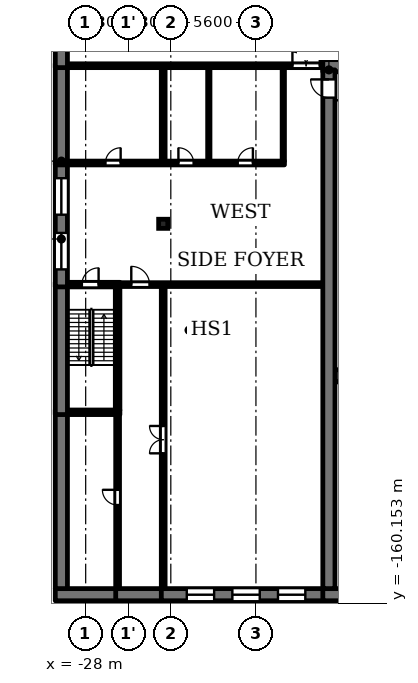
"""IFC4 building model, lengths in metres.
Left out: names, types, materials, properties, quantities, classifications, styles, units other than length and angle.
Written with IfcOpenShell. Run it as: python <this file> out.ifc"""

import sys

from ifc_helpers import new_model, si_unit, direction, frame, frame_2d, origin, origin_2d, place, context, subcontext, project, spatial, rectangle, extrude, element, fill, save


model = new_model("IFC4")
c1 = context("Model", 3, precision=1e-05, world=origin(), true_north=direction((0.0, 1.0)))
c2 = subcontext(c1, "Body", "Model", "MODEL_VIEW")
j1 = project(units=[si_unit("LENGTHUNIT", "METRE"), si_unit("PLANEANGLEUNIT", "RADIAN")], contexts=[c1])
p1 = place(None, origin())
s1 = spatial("IfcSite", under=j1, at=p1, CompositionType="ELEMENT")
p2 = place(p1, origin())
s2 = spatial("IfcBuilding", under=s1, at=p2, CompositionType="ELEMENT")
p3 = place(p2, frame((0.0, 0.0, 11.3)))
s3 = spatial("IfcBuildingStorey", under=s2, at=p3, CompositionType="ELEMENT", Elevation=11.3)
p4 = place(p3, frame((-22.9, -135.2, 0.0), z_axis=(0.0, 0.0, 1.0), x_axis=(1.0, 0.0, 0.0)))
e1 = element("IfcColumn", 1, at=p4, inside=s3, PredefinedType="COLUMN", context=c2, shape_type="SweptSolid", body=[
    extrude(rectangle(XDim=0.6, YDim=0.6, at=origin_2d()), origin(), (0.0, 0.0, 1.0), 4.45),
])
p5 = place(p3, frame((-30.0, -159.6, 0.0), z_axis=(0.0, 0.0, 1.0), x_axis=(1.0, 0.0, 0.0)))
e2 = element("IfcWall", 2, at=p5, inside=s3, PredefinedType="SOLIDWALL", context=c2, shape_type="SweptSolid", body=[
    extrude(rectangle(XDim=4.225, YDim=0.8, at=frame_2d((2.112, 0.0))), origin(), (0.0, 0.0, 1.0), 4.45),
])
p6 = place(p3, frame((-26.025, -159.6, 0.0), z_axis=(0.0, 0.0, 1.0), x_axis=(1.0, 0.0, 0.0)))
e3 = element("IfcWall", 3, at=p6, inside=s3, PredefinedType="SOLIDWALL", context=c2, shape_type="SweptSolid", body=[
    extrude(rectangle(XDim=3.25, YDim=0.8, at=frame_2d((1.625, 0.0))), origin(), (0.0, 0.0, 1.0), 4.45),
])
p7 = place(p3, frame((-23.025, -159.6, 0.0), z_axis=(0.0, 0.0, 1.0), x_axis=(1.0, 0.0, 0.0)))
e4 = element("IfcWall", 4, at=p7, inside=s3, PredefinedType="SOLIDWALL", context=c2, shape_type="SweptSolid", body=[
    extrude(rectangle(XDim=11.425, YDim=0.8, at=frame_2d((5.712, 0.0))), origin(), (0.0, 0.0, 1.0), 4.45),
])
p8 = place(p7, frame((1.675, 0.0, 0.9)))
e5 = element("IfcOpeningElement", 5, at=p8, cuts=e4, PredefinedType="OPENING", context=c2, shape_type="SweptSolid", body=[
    extrude(rectangle(XDim=1.8, YDim=1.5, at=frame_2d((0.9, 0.75))), frame((0.0, 0.41, 0.0), z_axis=(0.0, -1.0, 0.0), x_axis=(1.0, 0.0, 0.0)), (0.0, 0.0, 1.0), 0.82),
])
p9 = place(p7, frame((4.675, 0.0, 0.9)))
e6 = element("IfcOpeningElement", 6, at=p9, cuts=e4, PredefinedType="OPENING", context=c2, shape_type="SweptSolid", body=[
    extrude(rectangle(XDim=1.8, YDim=1.5, at=frame_2d((0.9, 0.75))), frame((0.0, 0.41, 0.0), z_axis=(0.0, -1.0, 0.0), x_axis=(1.0, 0.0, 0.0)), (0.0, 0.0, 1.0), 0.82),
])
p10 = place(p7, frame((7.675, 0.0, 0.9)))
e7 = element("IfcOpeningElement", 7, at=p10, cuts=e4, PredefinedType="OPENING", context=c2, shape_type="SweptSolid", body=[
    extrude(rectangle(XDim=1.8, YDim=1.5, at=frame_2d((0.9, 0.75))), frame((0.0, 0.41, 0.0), z_axis=(0.0, -1.0, 0.0), x_axis=(1.0, 0.0, 0.0)), (0.0, 0.0, 1.0), 0.82),
])
p11 = place(p3, frame((-12.4, -159.6, 0.0), z_axis=(0.0, 0.0, 1.0), x_axis=(1.0, 0.0, 0.0)))
e8 = element("IfcWall", 8, at=p11, inside=s3, PredefinedType="SOLIDWALL", context=c2, shape_type="SweptSolid", body=[
    extrude(rectangle(XDim=24.8, YDim=0.8, at=frame_2d((12.4, 0.0))), origin(), (0.0, 0.0, 1.0), 4.8),
])
p12 = place(p3, frame((-29.2, -147.6, 0.0), z_axis=(0.0, 0.0, 1.0), x_axis=(1.0, 0.0, 0.0)))
e9 = element("IfcWall", 9, at=p12, inside=s3, PredefinedType="SOLIDWALL", context=c2, shape_type="SweptSolid", body=[
    extrude(rectangle(XDim=3.45, YDim=0.3, at=frame_2d((1.725, 0.0))), origin(), (0.0, 0.0, 1.0), 4.45),
])
p13 = place(p3, frame((-11.6, -145.2, 0.0), z_axis=(0.0, 0.0, 1.0), x_axis=(1.0, 0.0, 0.0)))
e10 = element("IfcWall", 10, at=p13, inside=s3, PredefinedType="SOLIDWALL", context=c2, shape_type="SweptSolid", body=[
    extrude(rectangle(XDim=23.2, YDim=0.8, at=frame_2d((11.6, 0.0))), origin(), (0.0, 0.0, 1.0), 4.8),
])
p14 = place(p3, frame((-29.2, -139.2, 0.0), z_axis=(0.0, 0.0, 1.0), x_axis=(1.0, 0.0, 0.0)))
e11 = element("IfcWall", 11, at=p14, inside=s3, PredefinedType="SOLIDWALL", context=c2, shape_type="SweptSolid", body=[
    extrude(rectangle(XDim=3.45, YDim=0.3, at=frame_2d((1.725, 0.0))), origin(), (0.0, 0.0, 1.0), 4.45),
])
p15 = place(p14, frame((0.95, 0.0, 0.0)))
e12 = element("IfcOpeningElement", 12, at=p15, cuts=e11, PredefinedType="OPENING", context=c2, shape_type="SweptSolid", body=[
    extrude(rectangle(XDim=1.1, YDim=2.1, at=frame_2d((0.55, 1.05))), frame((0.0, 0.16, 0.0), z_axis=(0.0, -1.0, 0.0), x_axis=(1.0, 0.0, 0.0)), (0.0, 0.0, 1.0), 0.32),
])
p16 = place(p3, frame((-25.75, -139.2, 0.0), z_axis=(0.0, 0.0, 1.0), x_axis=(1.0, 0.0, 0.0)))
e13 = element("IfcWall", 13, at=p16, inside=s3, PredefinedType="SOLIDWALL", context=c2, shape_type="SweptSolid", body=[
    extrude(rectangle(XDim=13.35, YDim=0.25, at=frame_2d((6.675, 0.0))), origin(), (0.0, 0.0, 1.0), 4.45),
])
p17 = place(p16, frame((0.75, 0.0, 0.0)))
e14 = element("IfcOpeningElement", 14, at=p17, cuts=e13, PredefinedType="OPENING", context=c2, shape_type="SweptSolid", body=[
    extrude(rectangle(XDim=1.2, YDim=2.1, at=frame_2d((0.6, 1.05))), frame((0.0, 0.135, 0.0), z_axis=(0.0, -1.0, 0.0), x_axis=(1.0, 0.0, 0.0)), (0.0, 0.0, 1.0), 0.27),
])
p18 = place(p3, frame((-29.2, -131.2, 0.0), z_axis=(0.0, 0.0, 1.0), x_axis=(1.0, 0.0, 0.0)))
e15 = element("IfcWall", 15, at=p18, inside=s3, PredefinedType="SOLIDWALL", context=c2, shape_type="SweptSolid", body=[
    extrude(rectangle(XDim=14.275, YDim=0.25, at=frame_2d((7.137, 0.0))), origin(), (0.0, 0.0, 1.0), 4.45),
])
p19 = place(p18, frame((2.5, 0.0, 0.0)))
e16 = element("IfcOpeningElement", 16, at=p19, cuts=e15, PredefinedType="OPENING", context=c2, shape_type="SweptSolid", body=[
    extrude(rectangle(XDim=1.0, YDim=2.1, at=frame_2d((0.5, 1.05))), frame((0.0, 0.135, 0.0), z_axis=(0.0, -1.0, 0.0), x_axis=(1.0, 0.0, 0.0)), (0.0, 0.0, 1.0), 0.27),
])
p20 = place(p18, frame((7.3, 0.0, 0.0)))
e17 = element("IfcOpeningElement", 17, at=p20, cuts=e15, PredefinedType="OPENING", context=c2, shape_type="SweptSolid", body=[
    extrude(rectangle(XDim=1.0, YDim=2.1, at=frame_2d((0.5, 1.05))), frame((0.0, 0.135, 0.0), z_axis=(0.0, -1.0, 0.0), x_axis=(1.0, 0.0, 0.0)), (0.0, 0.0, 1.0), 0.27),
])
p21 = place(p18, frame((11.2, 0.0, 0.0)))
e18 = element("IfcOpeningElement", 18, at=p21, cuts=e15, PredefinedType="OPENING", context=c2, shape_type="SweptSolid", body=[
    extrude(rectangle(XDim=1.0, YDim=2.1, at=frame_2d((0.5, 1.05))), frame((0.0, 0.135, 0.0), z_axis=(0.0, -1.0, 0.0), x_axis=(1.0, 0.0, 0.0)), (0.0, 0.0, 1.0), 0.27),
])
p22 = place(p3, frame((-29.2, -124.8, 0.0), z_axis=(0.0, 0.0, 1.0), x_axis=(1.0, 0.0, 0.0)))
e19 = element("IfcWall", 19, at=p22, inside=s3, PredefinedType="SOLIDWALL", context=c2, shape_type="SweptSolid", body=[
    extrude(rectangle(XDim=16.8, YDim=0.25, at=frame_2d((8.4, 0.0))), origin(), (0.0, 0.0, 1.0), 4.45),
])
p23 = place(p22, frame((14.8, 0.0, 0.0)))
e20 = element("IfcOpeningElement", 20, at=p23, cuts=e19, PredefinedType="OPENING", context=c2, shape_type="SweptSolid", body=[
    extrude(rectangle(XDim=1.8, YDim=2.1, at=frame_2d((0.9, 1.05))), frame((0.0, 0.135, 0.0), z_axis=(0.0, -1.0, 0.0), x_axis=(1.0, 0.0, 0.0)), (0.0, 0.0, 1.0), 0.27),
])
p24 = place(p3, frame((-12.4, -124.8, 0.0), z_axis=(0.0, 0.0, 1.0), x_axis=(1.0, 0.0, 0.0)))
e21 = element("IfcWall", 21, at=p24, inside=s3, PredefinedType="SOLIDWALL", context=c2, shape_type="SweptSolid", body=[
    extrude(rectangle(XDim=24.8, YDim=0.8, at=frame_2d((12.4, 0.0))), origin(), (0.0, 0.0, 1.0), 4.8),
])
p25 = place(p24, frame((5.5, 0.0, 0.0)))
e22 = element("IfcOpeningElement", 22, at=p25, cuts=e21, PredefinedType="OPENING", context=c2, shape_type="SweptSolid", body=[
    extrude(rectangle(XDim=1.8, YDim=2.2, at=frame_2d((0.9, 1.1))), frame((0.0, 0.41, 0.0), z_axis=(0.0, -1.0, 0.0), x_axis=(1.0, 0.0, 0.0)), (0.0, 0.0, 1.0), 0.82),
])
p26 = place(p24, frame((17.5, 0.0, 0.0)))
e23 = element("IfcOpeningElement", 23, at=p26, cuts=e21, PredefinedType="OPENING", context=c2, shape_type="SweptSolid", body=[
    extrude(rectangle(XDim=1.8, YDim=2.2, at=frame_2d((0.9, 1.1))), frame((0.0, 0.41, 0.0), z_axis=(0.0, -1.0, 0.0), x_axis=(1.0, 0.0, 0.0)), (0.0, 0.0, 1.0), 0.82),
])
p27 = place(p3, frame((-29.6, -159.2, 0.0), z_axis=(0.0, 0.0, 1.0), x_axis=(0.0, 1.0, 0.0)))
e24 = element("IfcWall", 24, at=p27, inside=s3, PredefinedType="SOLIDWALL", context=c2, shape_type="SweptSolid", body=[
    extrude(rectangle(XDim=11.75, YDim=0.8, at=frame_2d((5.875, 0.0))), origin(), (0.0, 0.0, 1.0), 4.45),
])
p28 = place(p3, frame((-29.6, -147.75, 0.0), z_axis=(0.0, 0.0, 1.0), x_axis=(0.0, 1.0, 0.0)))
e25 = element("IfcWall", 25, at=p28, inside=s3, PredefinedType="SOLIDWALL", context=c2, shape_type="SweptSolid", body=[
    extrude(rectangle(XDim=8.7, YDim=0.8, at=frame_2d((4.35, 0.0))), origin(), (0.0, 0.0, 1.0), 4.45),
])
p29 = place(p3, frame((-29.6, -139.35, 0.0), z_axis=(0.0, 0.0, 1.0), x_axis=(0.0, 1.0, 0.0)))
e26 = element("IfcWall", 26, at=p29, inside=s3, PredefinedType="SOLIDWALL", context=c2, shape_type="SweptSolid", body=[
    extrude(rectangle(XDim=8.275, YDim=0.8, at=frame_2d((4.137, 0.0))), origin(), (0.0, 0.0, 1.0), 4.45),
])
p30 = place(p29, frame((1.15, 0.0, 0.6)))
e27 = element("IfcOpeningElement", 27, at=p30, cuts=e26, PredefinedType="OPENING", context=c2, shape_type="SweptSolid", body=[
    extrude(rectangle(XDim=2.4, YDim=3.2, at=frame_2d((1.2, 1.6))), frame((0.0, 0.41, 0.0), z_axis=(0.0, -1.0, 0.0), x_axis=(1.0, 0.0, 0.0)), (0.0, 0.0, 1.0), 0.82),
])
p31 = place(p29, frame((4.75, 0.0, 0.6)))
e28 = element("IfcOpeningElement", 28, at=p31, cuts=e26, PredefinedType="OPENING", context=c2, shape_type="SweptSolid", body=[
    extrude(rectangle(XDim=2.4, YDim=3.2, at=frame_2d((1.2, 1.6))), frame((0.0, 0.41, 0.0), z_axis=(0.0, -1.0, 0.0), x_axis=(1.0, 0.0, 0.0)), (0.0, 0.0, 1.0), 0.82),
])
p32 = place(p3, frame((-29.6, -131.325, 0.0), z_axis=(0.0, 0.0, 1.0), x_axis=(0.0, 1.0, 0.0)))
e29 = element("IfcWall", 29, at=p32, inside=s3, PredefinedType="SOLIDWALL", context=c2, shape_type="SweptSolid", body=[
    extrude(rectangle(XDim=6.65, YDim=0.8, at=frame_2d((3.325, 0.0))), origin(), (0.0, 0.0, 1.0), 4.45),
])
p33 = place(p3, frame((-29.6, -124.925, 0.0), z_axis=(0.0, 0.0, 1.0), x_axis=(0.0, 1.0, 0.0)))
e30 = element("IfcWall", 30, at=p33, inside=s3, PredefinedType="SOLIDWALL", context=c2, shape_type="SweptSolid", body=[
    extrude(rectangle(XDim=3.875, YDim=0.8, at=frame_2d((1.938, 0.0))), origin(), (0.0, 0.0, 1.0), 4.45),
])
p34 = place(p3, frame((-25.9, -159.2, 0.0), z_axis=(0.0, 0.0, 1.0), x_axis=(0.0, 1.0, 0.0)))
e31 = element("IfcWall", 31, at=p34, inside=s3, PredefinedType="SOLIDWALL", context=c2, shape_type="SweptSolid", body=[
    extrude(rectangle(XDim=11.45, YDim=0.25, at=frame_2d((5.725, 0.0))), origin(), (0.0, 0.0, 1.0), 4.45),
])
p35 = place(p34, frame((5.5, 0.0, 0.0)))
e32 = element("IfcOpeningElement", 32, at=p35, cuts=e31, PredefinedType="OPENING", context=c2, shape_type="SweptSolid", body=[
    extrude(rectangle(XDim=1.0, YDim=2.1, at=frame_2d((0.5, 1.05))), frame((0.0, 0.135, 0.0), z_axis=(0.0, -1.0, 0.0), x_axis=(1.0, 0.0, 0.0)), (0.0, 0.0, 1.0), 0.27),
])
p36 = place(p3, frame((-25.9, -147.45, 0.0), z_axis=(0.0, 0.0, 1.0), x_axis=(0.0, 1.0, 0.0)))
e33 = element("IfcWall", 33, at=p36, inside=s3, PredefinedType="SOLIDWALL", context=c2, shape_type="SweptSolid", body=[
    extrude(rectangle(XDim=8.225, YDim=0.3, at=frame_2d((4.112, 0.0))), origin(), (0.0, 0.0, 1.0), 4.45),
])
p37 = place(p3, frame((-22.9, -159.2, 0.0), z_axis=(0.0, 0.0, 1.0), x_axis=(0.0, 1.0, 0.0)))
e34 = element("IfcWall", 34, at=p37, inside=s3, PredefinedType="SOLIDWALL", context=c2, shape_type="SweptSolid", body=[
    extrude(rectangle(XDim=19.875, YDim=0.25, at=frame_2d((9.938, 0.0))), origin(), (0.0, 0.0, 1.0), 4.45),
])
p38 = place(p37, frame((8.9, 0.0, 0.0)))
e35 = element("IfcOpeningElement", 35, at=p38, cuts=e34, PredefinedType="OPENING", context=c2, shape_type="SweptSolid", body=[
    extrude(rectangle(XDim=1.8, YDim=2.1, at=frame_2d((0.9, 1.05))), frame((0.0, 0.135, 0.0), z_axis=(0.0, -1.0, 0.0), x_axis=(1.0, 0.0, 0.0)), (0.0, 0.0, 1.0), 0.27),
])
p39 = place(p3, frame((-22.9, -131.075, 0.0), z_axis=(0.0, 0.0, 1.0), x_axis=(0.0, 1.0, 0.0)))
e36 = element("IfcWall", 36, at=p39, inside=s3, PredefinedType="SOLIDWALL", context=c2, shape_type="SweptSolid", body=[
    extrude(rectangle(XDim=6.15, YDim=0.25, at=frame_2d((3.075, 0.0))), origin(), (0.0, 0.0, 1.0), 4.45),
])
for number, where, z_axis, x_axis in (
    (37, (-19.9, -131.075, 0.0), (0.0, 0.0, 1.0), (0.0, 1.0, 0.0)),
    (38, (-15.0, -131.075, 0.0), (0.0, 0.0, 1.0), (0.0, 1.0, 0.0)),
):
    element("IfcWall", number, at=place(p3, frame(where, z_axis=z_axis, x_axis=x_axis)), inside=s3, PredefinedType="PARTITIONING", context=c2, shape_type="SweptSolid", body=[
        extrude(rectangle(XDim=6.15, YDim=0.15, at=frame_2d((3.075, 0.0))), origin(), (0.0, 0.0, 1.0), 4.45),
    ])
p40 = place(p3, frame((-12.0, -159.2, 0.0), z_axis=(0.0, 0.0, 1.0), x_axis=(0.0, 1.0, 0.0)))
e39 = element("IfcWall", 39, at=p40, inside=s3, PredefinedType="SOLIDWALL", context=c2, shape_type="SweptSolid", body=[
    extrude(rectangle(XDim=34.125, YDim=0.8, at=frame_2d((17.062, 0.0))), origin(), (0.0, 0.0, 1.0), 4.8),
])
p41 = place(p40, frame((32.3, 0.0, 0.0)))
e40 = element("IfcOpeningElement", 40, at=p41, cuts=e39, PredefinedType="OPENING", context=c2, shape_type="SweptSolid", body=[
    extrude(rectangle(XDim=1.2, YDim=2.1, at=frame_2d((0.6, 1.05))), frame((0.0, 0.41, 0.0), z_axis=(0.0, -1.0, 0.0), x_axis=(1.0, 0.0, 0.0)), (0.0, 0.0, 1.0), 0.82),
])
p42 = place(p30, origin())
e41 = element("IfcWindow", 41, at=p42, inside=s3, PartitioningType="SINGLE_PANEL", PredefinedType="WINDOW", context=c2, shape_type="SweptSolid", body=[
    extrude(rectangle(XDim=2.4, YDim=3.2, at=frame_2d((1.2, 1.6))), frame((0.0, 0.03, 0.0), z_axis=(0.0, -1.0, 0.0), x_axis=(1.0, 0.0, 0.0)), (0.0, 0.0, 1.0), 0.06),
])
fill(e27, e41)
p43 = place(p31, origin())
e42 = element("IfcWindow", 42, at=p43, inside=s3, PartitioningType="SINGLE_PANEL", PredefinedType="WINDOW", context=c2, shape_type="SweptSolid", body=[
    extrude(rectangle(XDim=2.4, YDim=3.2, at=frame_2d((1.2, 1.6))), frame((0.0, 0.03, 0.0), z_axis=(0.0, -1.0, 0.0), x_axis=(1.0, 0.0, 0.0)), (0.0, 0.0, 1.0), 0.06),
])
fill(e28, e42)
p44 = place(p8, origin())
e43 = element("IfcWindow", 43, at=p44, inside=s3, PartitioningType="SINGLE_PANEL", PredefinedType="WINDOW", context=c2, shape_type="SweptSolid", body=[
    extrude(rectangle(XDim=1.8, YDim=1.5, at=frame_2d((0.9, 0.75))), frame((0.0, 0.03, 0.0), z_axis=(0.0, -1.0, 0.0), x_axis=(1.0, 0.0, 0.0)), (0.0, 0.0, 1.0), 0.06),
])
fill(e5, e43)
p45 = place(p9, origin())
e44 = element("IfcWindow", 44, at=p45, inside=s3, PartitioningType="SINGLE_PANEL", PredefinedType="WINDOW", context=c2, shape_type="SweptSolid", body=[
    extrude(rectangle(XDim=1.8, YDim=1.5, at=frame_2d((0.9, 0.75))), frame((0.0, 0.03, 0.0), z_axis=(0.0, -1.0, 0.0), x_axis=(1.0, 0.0, 0.0)), (0.0, 0.0, 1.0), 0.06),
])
fill(e6, e44)
p46 = place(p10, origin())
e45 = element("IfcWindow", 45, at=p46, inside=s3, PartitioningType="SINGLE_PANEL", PredefinedType="WINDOW", context=c2, shape_type="SweptSolid", body=[
    extrude(rectangle(XDim=1.8, YDim=1.5, at=frame_2d((0.9, 0.75))), frame((0.0, 0.03, 0.0), z_axis=(0.0, -1.0, 0.0), x_axis=(1.0, 0.0, 0.0)), (0.0, 0.0, 1.0), 0.06),
])
fill(e7, e45)
p47 = place(p15, origin())
e46 = element("IfcDoor", 46, at=p47, inside=s3, OperationType="SINGLE_SWING_RIGHT", PredefinedType="DOOR", context=c2, shape_type="SweptSolid", body=[
    extrude(rectangle(XDim=1.1, YDim=2.1, at=frame_2d((0.55, 1.05))), frame((0.0, 0.025, 0.0), z_axis=(0.0, -1.0, 0.0), x_axis=(1.0, 0.0, 0.0)), (0.0, 0.0, 1.0), 0.05),
])
fill(e12, e46)
p48 = place(p41, origin())
e47 = element("IfcDoor", 47, at=p48, inside=s3, OperationType="SINGLE_SWING_RIGHT", PredefinedType="DOOR", context=c2, shape_type="SweptSolid", body=[
    extrude(rectangle(XDim=1.2, YDim=2.1, at=frame_2d((0.6, 1.05))), frame((0.0, 0.025, 0.0), z_axis=(0.0, -1.0, 0.0), x_axis=(1.0, 0.0, 0.0)), (0.0, 0.0, 1.0), 0.05),
])
fill(e40, e47)
p49 = place(p23, origin())
e48 = element("IfcDoor", 48, at=p49, inside=s3, OperationType="DOUBLE_DOOR_SINGLE_SWING", PredefinedType="DOOR", context=c2, shape_type="SweptSolid", body=[
    extrude(rectangle(XDim=1.8, YDim=2.1, at=frame_2d((0.9, 1.05))), frame((0.0, 0.025, 0.0), z_axis=(0.0, -1.0, 0.0), x_axis=(1.0, 0.0, 0.0)), (0.0, 0.0, 1.0), 0.05),
])
fill(e20, e48)
p50 = place(p19, origin())
e49 = element("IfcDoor", 49, at=p50, inside=s3, OperationType="SINGLE_SWING_RIGHT", PredefinedType="DOOR", context=c2, shape_type="SweptSolid", body=[
    extrude(rectangle(XDim=1.0, YDim=2.1, at=frame_2d((0.5, 1.05))), frame((0.0, 0.025, 0.0), z_axis=(0.0, -1.0, 0.0), x_axis=(1.0, 0.0, 0.0)), (0.0, 0.0, 1.0), 0.05),
])
fill(e16, e49)
p51 = place(p20, origin())
e50 = element("IfcDoor", 50, at=p51, inside=s3, OperationType="SINGLE_SWING_LEFT", PredefinedType="DOOR", context=c2, shape_type="SweptSolid", body=[
    extrude(rectangle(XDim=1.0, YDim=2.1, at=frame_2d((0.5, 1.05))), frame((0.0, 0.025, 0.0), z_axis=(0.0, -1.0, 0.0), x_axis=(1.0, 0.0, 0.0)), (0.0, 0.0, 1.0), 0.05),
])
fill(e17, e50)
p52 = place(p21, origin())
e51 = element("IfcDoor", 51, at=p52, inside=s3, OperationType="SINGLE_SWING_RIGHT", PredefinedType="DOOR", context=c2, shape_type="SweptSolid", body=[
    extrude(rectangle(XDim=1.0, YDim=2.1, at=frame_2d((0.5, 1.05))), frame((0.0, 0.025, 0.0), z_axis=(0.0, -1.0, 0.0), x_axis=(1.0, 0.0, 0.0)), (0.0, 0.0, 1.0), 0.05),
])
fill(e18, e51)
p53 = place(p17, origin())
e52 = element("IfcDoor", 52, at=p53, inside=s3, OperationType="SINGLE_SWING_LEFT", PredefinedType="DOOR", context=c2, shape_type="SweptSolid", body=[
    extrude(rectangle(XDim=1.2, YDim=2.1, at=frame_2d((0.6, 1.05))), frame((0.0, 0.025, 0.0), z_axis=(0.0, -1.0, 0.0), x_axis=(1.0, 0.0, 0.0)), (0.0, 0.0, 1.0), 0.05),
])
fill(e14, e52)
p54 = place(p38, origin())
e53 = element("IfcDoor", 53, at=p54, inside=s3, OperationType="DOUBLE_DOOR_SINGLE_SWING", PredefinedType="DOOR", context=c2, shape_type="SweptSolid", body=[
    extrude(rectangle(XDim=1.8, YDim=2.1, at=frame_2d((0.9, 1.05))), frame((0.0, 0.025, 0.0), z_axis=(0.0, -1.0, 0.0), x_axis=(1.0, 0.0, 0.0)), (0.0, 0.0, 1.0), 0.05),
])
fill(e35, e53)
p55 = place(p35, origin())
e54 = element("IfcDoor", 54, at=p55, inside=s3, OperationType="SINGLE_SWING_RIGHT", PredefinedType="DOOR", context=c2, shape_type="SweptSolid", body=[
    extrude(rectangle(XDim=1.0, YDim=2.1, at=frame_2d((0.5, 1.05))), frame((0.0, 0.025, 0.0), z_axis=(0.0, -1.0, 0.0), x_axis=(1.0, 0.0, 0.0)), (0.0, 0.0, 1.0), 0.05),
])
fill(e32, e54)
save(model, sys.argv[1])
